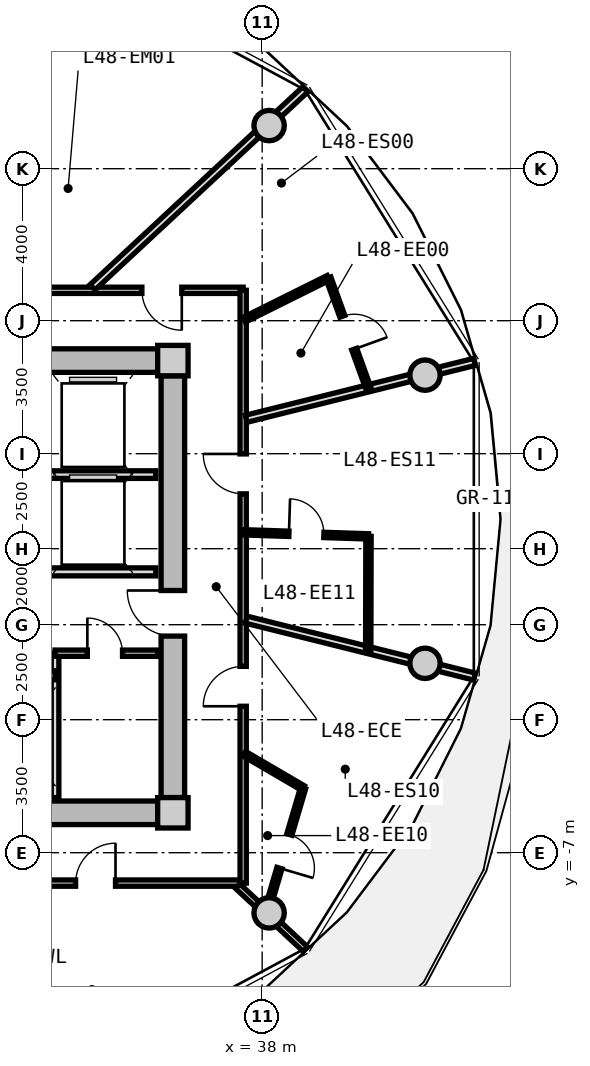
"""IFC4 building model, lengths in metres.
Left out: names, types, materials, properties, quantities, classifications, styles, units other than length and angle.
Written with IfcOpenShell. Run it as: python <this file> out.ifc"""

import sys

from ifc_helpers import new_model, si_unit, direction, frame, frame_2d, origin, origin_2d, place, context, subcontext, project, spatial, rectangle, circle, extrude, source, transform, mapped, element, fill, save


model = new_model("IFC4")
c1 = context("Model", 3, precision=1e-05, world=origin(), true_north=direction((0.0, 1.0)))
c2 = subcontext(c1, "Body", "Model", "MODEL_VIEW")
j1 = project(units=[si_unit("LENGTHUNIT", "METRE"), si_unit("PLANEANGLEUNIT", "RADIAN")], contexts=[c1])
p1 = place(None, origin())
s1 = spatial("IfcSite", under=j1, at=p1, CompositionType="ELEMENT")
p2 = place(p1, origin())
s2 = spatial("IfcBuilding", under=s1, at=p2, CompositionType="ELEMENT")
p3 = place(p2, frame((0.0, 0.0, 155.65)))
s3 = spatial("IfcBuildingStorey", under=s2, at=p3, CompositionType="ELEMENT", Elevation=155.65)
m1 = source(origin(), c2, "Body", "SweptSolid", [
    extrude(rectangle(XDim=0.8, YDim=0.8, at=origin_2d()), origin(), (0.0, 0.0, 1.0), 3.05),
])
for number, where, z_axis, x_axis in (
    (1, (35.65, -5.95, 0.0), (0.0, 0.0, 1.0), (1.0, 0.0, 0.0)),
    (2, (35.65, 5.95, 0.0), (0.0, 0.0, 1.0), (1.0, 0.0, 0.0)),
):
    element("IfcColumn", number, at=place(p3, frame(where, z_axis=z_axis, x_axis=x_axis)), inside=s3, PredefinedType="COLUMN", context=c2, shape_type="MappedRepresentation", body=[
        mapped(m1, transform((0.0, 0.0, 0.0), x_axis=(1.0, 0.0, 0.0), y_axis=(0.0, 1.0, 0.0), z_axis=(0.0, 0.0, 1.0), scale=1.0)),
    ])
m2 = source(origin(), c2, "Body", "SweptSolid", [
    extrude(rectangle(XDim=14.5, YDim=0.62, at=frame_2d((7.25, 0.0))), origin(), (0.0, 0.0, 1.0), 2.81),
])
for number, where, z_axis, x_axis in (
    (3, (20.75, 5.95, 0.0), (0.0, 0.0, 1.0), (1.0, 0.0, 0.0)),
    (4, (35.25, -5.95, 0.0), (0.0, 0.0, 1.0), (-1.0, 0.0, 0.0)),
):
    element("IfcWall", number, at=place(p3, frame(where, z_axis=z_axis, x_axis=x_axis)), inside=s3, PredefinedType="SHEAR", context=c2, shape_type="MappedRepresentation", body=[
        mapped(m2, transform((0.0, 0.0, 0.0), x_axis=(1.0, 0.0, 0.0), y_axis=(0.0, 1.0, 0.0), z_axis=(0.0, 0.0, 1.0), scale=1.0)),
    ])
m3 = source(origin(), c2, "Body", "SweptSolid", [
    extrude(rectangle(XDim=11.1, YDim=0.62, at=frame_2d((5.55, 0.0))), origin(), (0.0, 0.0, 1.0), 2.81),
])
p4 = place(p3, frame((35.65, 5.55, 0.0), z_axis=(0.0, 0.0, 1.0), x_axis=(0.0, -1.0, 0.0)))
e5 = element("IfcWall", 5, at=p4, inside=s3, PredefinedType="SHEAR", context=c2, shape_type="MappedRepresentation", body=[
    mapped(m3, transform((0.0, 0.0, 0.0), x_axis=(1.0, 0.0, 0.0), y_axis=(0.0, 1.0, 0.0), z_axis=(0.0, 0.0, 1.0), scale=1.0)),
])
p5 = place(p4, frame((5.65, 0.0, 0.0)))
e6 = element("IfcOpeningElement", 6, at=p5, cuts=e5, PredefinedType="OPENING", context=c2, shape_type="SweptSolid", body=[
    extrude(rectangle(XDim=1.2, YDim=2.15, at=frame_2d((0.6, 1.075))), frame((0.0, 0.32, 0.0), z_axis=(0.0, -1.0, 0.0), x_axis=(1.0, 0.0, 0.0)), (0.0, 0.0, 1.0), 0.64),
])
m4 = source(origin(), c2, "Body", "SweptSolid", [
    extrude(circle(Radius=0.4, at=origin_2d()), origin(), (0.0, 0.0, 1.0), 3.05),
])
for number, where, z_axis, x_axis in (
    (7, (42.285, 5.567, 0.0), (0.0, 0.0, 1.0), (1.0, 0.0, 0.0)),
    (8, (38.183, 12.135, 0.0), (0.0, 0.0, 1.0), (1.0, 0.0, 0.0)),
    (9, (38.183, -8.584, 0.0), (0.0, 0.0, 1.0), (1.0, 0.0, 0.0)),
    (10, (42.285, -2.016, 0.0), (0.0, 0.0, 1.0), (1.0, 0.0, 0.0)),
):
    element("IfcColumn", number, at=place(p3, frame(where, z_axis=z_axis, x_axis=x_axis)), inside=s3, PredefinedType="COLUMN", context=c2, shape_type="MappedRepresentation", body=[
        mapped(m4, transform((0.0, 0.0, 0.0), x_axis=(1.0, 0.0, 0.0), y_axis=(0.0, 1.0, 0.0), z_axis=(0.0, 0.0, 1.0), scale=1.0)),
    ])
m5 = source(origin(), c2, "Body", "SweptSolid", [
    extrude(rectangle(XDim=3.2, YDim=0.2, at=frame_2d((1.6, 0.0))), origin(), (0.0, 0.0, 1.0), 2.795),
])
p6 = place(p3, frame((32.0, 2.95, 0.0), z_axis=(0.0, 0.0, 1.0), x_axis=(1.0, 0.0, 0.0)))
e11 = element("IfcWall", 11, at=p6, inside=s3, PredefinedType="PARTITIONING", context=c2, shape_type="MappedRepresentation", body=[
    mapped(m5, transform((0.0, 0.0, 0.0), x_axis=(1.0, 0.0, 0.0), y_axis=(0.0, 1.0, 0.0), z_axis=(0.0, 0.0, 1.0), scale=1.0)),
])
m6 = source(origin(), c2, "Body", "SweptSolid", [
    extrude(rectangle(XDim=6.66, YDim=0.21, at=frame_2d((3.33, 0.0))), origin(), (0.0, 0.0, 1.0), 2.795),
])
p7 = place(p3, frame((28.54, 0.39, 0.0), z_axis=(0.0, 0.0, 1.0), x_axis=(1.0, 0.0, 0.0)))
e12 = element("IfcWall", 12, at=p7, inside=s3, PredefinedType="PARTITIONING", context=c2, shape_type="MappedRepresentation", body=[
    mapped(m6, transform((0.0, 0.0, 0.0), x_axis=(1.0, 0.0, 0.0), y_axis=(0.0, 1.0, 0.0), z_axis=(0.0, 0.0, 1.0), scale=1.0)),
])
p8 = place(p7, frame((1.0, 0.0, 0.0)))
e13 = element("IfcOpeningElement", 13, at=p8, cuts=e12, PredefinedType="OPENING", context=c2, shape_type="SweptSolid", body=[
    extrude(rectangle(XDim=1.2, YDim=2.15, at=frame_2d((0.6, 1.075))), frame((0.0, 0.115, 0.0), z_axis=(0.0, -1.0, 0.0), x_axis=(1.0, 0.0, 0.0)), (0.0, 0.0, 1.0), 0.23),
])
m7 = source(origin(), c2, "Body", "SweptSolid", [
    extrude(rectangle(XDim=3.8, YDim=0.2, at=frame_2d((1.9, 0.0))), origin(), (0.0, 0.0, 1.0), 2.795),
])
p9 = place(p3, frame((32.55, -5.55, 0.0), z_axis=(0.0, 0.0, 1.0), x_axis=(0.0, 1.0, 0.0)))
e14 = element("IfcWall", 14, at=p9, inside=s3, PredefinedType="PARTITIONING", context=c2, shape_type="MappedRepresentation", body=[
    mapped(m7, transform((0.0, 0.0, 0.0), x_axis=(1.0, 0.0, 0.0), y_axis=(0.0, 1.0, 0.0), z_axis=(0.0, 0.0, 1.0), scale=1.0)),
])
m8 = source(origin(), c2, "Body", "SweptSolid", [
    extrude(rectangle(XDim=4.13, YDim=0.24, at=frame_2d((2.065, 0.0))), origin(), (0.0, 0.0, 1.0), 2.795),
])
p10 = place(p3, frame((28.42, -2.33, 0.0), z_axis=(0.0, 0.0, 1.0), x_axis=(1.0, 0.0, 0.0)))
e15 = element("IfcWall", 15, at=p10, inside=s3, PredefinedType="PARTITIONING", context=c2, shape_type="MappedRepresentation", body=[
    mapped(m8, transform((0.0, 0.0, 0.0), x_axis=(1.0, 0.0, 0.0), y_axis=(0.0, 1.0, 0.0), z_axis=(0.0, 0.0, 1.0), scale=1.0)),
])
p11 = place(p10, frame((0.5, 0.0, 0.0)))
e16 = element("IfcOpeningElement", 16, at=p11, cuts=e15, PredefinedType="OPENING", context=c2, shape_type="SweptSolid", body=[
    extrude(rectangle(XDim=1.1, YDim=2.2, at=frame_2d((0.55, 1.1))), frame((0.0, 0.13, 0.0), z_axis=(0.0, -1.0, 0.0), x_axis=(1.0, 0.0, 0.0)), (0.0, 0.0, 1.0), 0.26),
])
p12 = place(p10, frame((2.55, 0.0, 0.0)))
e17 = element("IfcOpeningElement", 17, at=p12, cuts=e15, PredefinedType="OPENING", context=c2, shape_type="SweptSolid", body=[
    extrude(rectangle(XDim=1.1, YDim=2.2, at=frame_2d((0.55, 1.1))), frame((0.0, 0.13, 0.0), z_axis=(0.0, -1.0, 0.0), x_axis=(1.0, 0.0, 0.0)), (0.0, 0.0, 1.0), 0.26),
])
m9 = source(origin(), c2, "Body", "SweptSolid", [
    extrude(rectangle(XDim=2.7, YDim=0.165, at=frame_2d((1.35, 0.0))), origin(), (0.0, 0.0, 1.0), 2.795),
])
p13 = place(p3, frame((32.55, -1.75, 0.0), z_axis=(0.0, 0.0, 1.0), x_axis=(1.0, 0.0, 0.0)))
e18 = element("IfcWall", 18, at=p13, inside=s3, PredefinedType="PARTITIONING", context=c2, shape_type="MappedRepresentation", body=[
    mapped(m9, transform((0.0, 0.0, 0.0), x_axis=(1.0, 0.0, 0.0), y_axis=(0.0, 1.0, 0.0), z_axis=(0.0, 0.0, 1.0), scale=1.0)),
])
p14 = place(p13, frame((0.85, 0.0, 0.0)))
e19 = element("IfcOpeningElement", 19, at=p14, cuts=e18, PredefinedType="OPENING", context=c2, shape_type="SweptSolid", body=[
    extrude(rectangle(XDim=0.925, YDim=2.1, at=frame_2d((0.462, 1.05))), frame((0.0, 0.093, 0.0), z_axis=(0.0, -1.0, 0.0), x_axis=(1.0, 0.0, 0.0)), (0.0, 0.0, 1.0), 0.185),
])
m10 = source(origin(), c2, "Body", "SweptSolid", [
    extrude(rectangle(XDim=8.719, YDim=0.165, at=frame_2d((4.36, 0.0))), origin(), (0.0, 0.0, 1.0), 2.795),
])
p15 = place(p3, frame((28.781, 7.8, 0.0), z_axis=(0.0, 0.0, 1.0), x_axis=(1.0, 0.0, 0.0)))
e20 = element("IfcWall", 20, at=p15, inside=s3, PredefinedType="PARTITIONING", context=c2, shape_type="MappedRepresentation", body=[
    mapped(m10, transform((0.0, 0.0, 0.0), x_axis=(1.0, 0.0, 0.0), y_axis=(0.0, 1.0, 0.0), z_axis=(0.0, 0.0, 1.0), scale=1.0)),
])
p16 = place(p15, frame((6.054, 0.0, 0.0)))
e21 = element("IfcOpeningElement", 21, at=p16, cuts=e20, PredefinedType="OPENING", context=c2, shape_type="SweptSolid", body=[
    extrude(rectangle(XDim=1.05, YDim=2.15, at=frame_2d((0.525, 1.075))), frame((0.0, 0.093, 0.0), z_axis=(0.0, -1.0, 0.0), x_axis=(1.0, 0.0, 0.0)), (0.0, 0.0, 1.0), 0.185),
])
p17 = place(p15, frame((1.891, 0.0, 0.0)))
e22 = element("IfcOpeningElement", 22, at=p17, cuts=e20, PredefinedType="OPENING", context=c2, shape_type="SweptSolid", body=[
    extrude(rectangle(XDim=1.25, YDim=2.2, at=frame_2d((0.625, 1.1))), frame((0.0, 0.093, 0.0), z_axis=(0.0, -1.0, 0.0), x_axis=(1.0, 0.0, 0.0)), (0.0, 0.0, 1.0), 0.185),
])
m11 = source(origin(), c2, "Body", "SweptSolid", [
    extrude(rectangle(XDim=8.6, YDim=0.165, at=frame_2d((4.3, 0.0))), origin(), (0.0, 0.0, 1.0), 2.795),
])
p18 = place(p3, frame((37.5, -7.8, 0.0), z_axis=(0.0, 0.0, 1.0), x_axis=(-1.0, 0.0, 0.0)))
e23 = element("IfcWall", 23, at=p18, inside=s3, PredefinedType="PARTITIONING", context=c2, shape_type="MappedRepresentation", body=[
    mapped(m11, transform((0.0, 0.0, 0.0), x_axis=(1.0, 0.0, 0.0), y_axis=(0.0, 1.0, 0.0), z_axis=(0.0, 0.0, 1.0), scale=1.0)),
])
p19 = place(p18, frame((3.359, 0.0, 0.0)))
e24 = element("IfcOpeningElement", 24, at=p19, cuts=e23, PredefinedType="OPENING", context=c2, shape_type="SweptSolid", body=[
    extrude(rectangle(XDim=1.05, YDim=2.15, at=frame_2d((0.525, 1.075))), frame((0.0, 0.093, 0.0), z_axis=(0.0, -1.0, 0.0), x_axis=(1.0, 0.0, 0.0)), (0.0, 0.0, 1.0), 0.185),
])
m12 = source(origin(), c2, "Body", "SweptSolid", [
    extrude(rectangle(XDim=15.6, YDim=0.165, at=frame_2d((7.8, 0.0))), origin(), (0.0, 0.0, 1.0), 2.795),
])
p20 = place(p3, frame((37.5, 7.8, 0.0), z_axis=(0.0, 0.0, 1.0), x_axis=(0.0, -1.0, 0.0)))
e25 = element("IfcWall", 25, at=p20, inside=s3, PredefinedType="PARTITIONING", context=c2, shape_type="MappedRepresentation", body=[
    mapped(m12, transform((0.0, 0.0, 0.0), x_axis=(1.0, 0.0, 0.0), y_axis=(0.0, 1.0, 0.0), z_axis=(0.0, 0.0, 1.0), scale=1.0)),
])
p21 = place(p20, frame((9.896, 0.0, 0.0)))
e26 = element("IfcOpeningElement", 26, at=p21, cuts=e25, PredefinedType="OPENING", context=c2, shape_type="SweptSolid", body=[
    extrude(rectangle(XDim=1.05, YDim=2.15, at=frame_2d((0.525, 1.075))), frame((0.0, 0.093, 0.0), z_axis=(0.0, -1.0, 0.0), x_axis=(1.0, 0.0, 0.0)), (0.0, 0.0, 1.0), 0.185),
])
p22 = place(p20, frame((4.306, 0.0, 0.0)))
e27 = element("IfcOpeningElement", 27, at=p22, cuts=e25, PredefinedType="OPENING", context=c2, shape_type="SweptSolid", body=[
    extrude(rectangle(XDim=1.05, YDim=2.15, at=frame_2d((0.525, 1.075))), frame((0.0, 0.093, 0.0), z_axis=(0.0, -1.0, 0.0), x_axis=(1.0, 0.0, 0.0)), (0.0, 0.0, 1.0), 0.185),
])
m13 = source(origin(), c2, "Body", "SweptSolid", [
    extrude(rectangle(XDim=2.435, YDim=0.165, at=frame_2d((1.217, 0.0))), origin(), (0.0, 0.0, 1.0), 2.345),
])
p23 = place(p3, frame((37.354, -7.88, 0.0), z_axis=(0.0, 0.0, 1.0), x_axis=(0.732164643118, -0.681127693878, 0.0)))
e28 = element("IfcWall", 28, at=p23, inside=s3, PredefinedType="PARTITIONING", context=c2, shape_type="MappedRepresentation", body=[
    mapped(m13, transform((0.0, 0.0, 0.0), x_axis=(1.0, 0.0, 0.0), y_axis=(0.0, 1.0, 0.0), z_axis=(0.0, 0.0, 1.0), scale=1.0)),
])
m14 = source(origin(), c2, "Body", "SweptSolid", [
    extrude(rectangle(XDim=6.193, YDim=0.19, at=frame_2d((3.096, 0.0))), origin(), (0.0, 0.0, 1.0), 2.345),
])
p24 = place(p3, frame((37.58, -0.868, 0.0), z_axis=(0.0, 0.0, 1.0), x_axis=(0.970309243466, -0.241867674657, 0.0)))
e29 = element("IfcWall", 29, at=p24, inside=s3, PredefinedType="PARTITIONING", context=c2, shape_type="MappedRepresentation", body=[
    mapped(m14, transform((0.0, 0.0, 0.0), x_axis=(1.0, 0.0, 0.0), y_axis=(0.0, 1.0, 0.0), z_axis=(0.0, 0.0, 1.0), scale=1.0)),
])
m15 = source(origin(), c2, "Body", "SweptSolid", [
    extrude(rectangle(XDim=1.791, YDim=0.14, at=frame_2d((0.896, 0.0))), origin(), (0.0, 0.0, 1.0), 2.795),
])
p25 = place(p3, frame((37.53, -4.396, 0.0), z_axis=(0.0, 0.0, 1.0), x_axis=(0.863294053295, -0.504701275553, 0.0)))
e30 = element("IfcWall", 30, at=p25, inside=s3, PredefinedType="PARTITIONING", context=c2, shape_type="MappedRepresentation", body=[
    mapped(m15, transform((0.0, 0.0, 0.0), x_axis=(1.0, 0.0, 0.0), y_axis=(0.0, 1.0, 0.0), z_axis=(0.0, 0.0, 1.0), scale=1.0)),
])
m16 = source(origin(), c2, "Body", "SweptSolid", [
    extrude(rectangle(XDim=3.47, YDim=0.14, at=frame_2d((1.735, 0.0))), origin(), (0.0, 0.0, 1.0), 2.795),
])
p26 = place(p3, frame((39.076, -5.3, 0.0), z_axis=(0.0, 0.0, 1.0), x_axis=(-0.283194656898, -0.959062451723, 0.0)))
e31 = element("IfcWall", 31, at=p26, inside=s3, PredefinedType="PARTITIONING", context=c2, shape_type="MappedRepresentation", body=[
    mapped(m16, transform((0.0, 0.0, 0.0), x_axis=(1.0, 0.0, 0.0), y_axis=(0.0, 1.0, 0.0), z_axis=(0.0, 0.0, 1.0), scale=1.0)),
])
p27 = place(p26, frame((1.275, 0.0, 0.0)))
e32 = element("IfcOpeningElement", 32, at=p27, cuts=e31, PredefinedType="OPENING", context=c2, shape_type="SweptSolid", body=[
    extrude(rectangle(XDim=0.92, YDim=2.1, at=frame_2d((0.46, 1.05))), frame((0.0, 0.08, 0.0), z_axis=(0.0, -1.0, 0.0), x_axis=(1.0, 0.0, 0.0)), (0.0, 0.0, 1.0), 0.16),
])
p28 = place(p3, frame((37.58, 4.419, 0.0), z_axis=(0.0, 0.0, 1.0), x_axis=(0.970309243466, 0.241867674657, 0.0)))
e33 = element("IfcWall", 33, at=p28, inside=s3, PredefinedType="PARTITIONING", context=c2, shape_type="MappedRepresentation", body=[
    mapped(m14, transform((0.0, 0.0, 0.0), x_axis=(1.0, 0.0, 0.0), y_axis=(0.0, 1.0, 0.0), z_axis=(0.0, 0.0, 1.0), scale=1.0)),
])
m17 = source(origin(), c2, "Body", "SweptSolid", [
    extrude(rectangle(XDim=3.269, YDim=0.14, at=frame_2d((1.635, 0.0))), origin(), (0.0, 0.0, 1.0), 2.795),
])
p29 = place(p3, frame((37.53, 1.43, 0.0), z_axis=(0.0, 0.0, 1.0), x_axis=(0.999467384322, -0.032633536084, 0.0)))
e34 = element("IfcWall", 34, at=p29, inside=s3, PredefinedType="PARTITIONING", context=c2, shape_type="MappedRepresentation", body=[
    mapped(m17, transform((0.0, 0.0, 0.0), x_axis=(1.0, 0.0, 0.0), y_axis=(0.0, 1.0, 0.0), z_axis=(0.0, 0.0, 1.0), scale=1.0)),
])
p30 = place(p29, frame((1.175, 0.0, 0.0)))
e35 = element("IfcOpeningElement", 35, at=p30, cuts=e34, PredefinedType="OPENING", context=c2, shape_type="SweptSolid", body=[
    extrude(rectangle(XDim=0.92, YDim=2.1, at=frame_2d((0.46, 1.05))), frame((0.0, 0.08, 0.0), z_axis=(0.0, -1.0, 0.0), x_axis=(1.0, 0.0, 0.0)), (0.0, 0.0, 1.0), 0.16),
])
m18 = source(origin(), c2, "Body", "SweptSolid", [
    extrude(rectangle(XDim=3.012, YDim=0.14, at=frame_2d((1.506, 0.0))), origin(), (0.0, 0.0, 1.0), 2.795),
])
p31 = place(p3, frame((40.798, 1.324, 0.0), z_axis=(0.0, 0.0, 1.0), x_axis=(-0.00226958968, -0.999997424478, 0.0)))
e36 = element("IfcWall", 36, at=p31, inside=s3, PredefinedType="PARTITIONING", context=c2, shape_type="MappedRepresentation", body=[
    mapped(m18, transform((0.0, 0.0, 0.0), x_axis=(1.0, 0.0, 0.0), y_axis=(0.0, 1.0, 0.0), z_axis=(0.0, 0.0, 1.0), scale=1.0)),
])
m19 = source(origin(), c2, "Body", "SweptSolid", [
    extrude(rectangle(XDim=7.648, YDim=0.19, at=frame_2d((3.824, 0.0))), origin(), (0.0, 0.0, 1.0), 2.345),
])
p32 = place(p3, frame((33.538, 7.88, 0.0), z_axis=(0.0, 0.0, 1.0), x_axis=(0.732167856666, 0.681124239522, 0.0)))
e37 = element("IfcWall", 37, at=p32, inside=s3, PredefinedType="PARTITIONING", context=c2, shape_type="MappedRepresentation", body=[
    mapped(m19, transform((0.0, 0.0, 0.0), x_axis=(1.0, 0.0, 0.0), y_axis=(0.0, 1.0, 0.0), z_axis=(0.0, 0.0, 1.0), scale=1.0)),
])
m20 = source(origin(), c2, "Body", "SweptSolid", [
    extrude(rectangle(XDim=2.471, YDim=0.14, at=frame_2d((1.235, 0.0))), origin(), (0.0, 0.0, 1.0), 2.795),
])
p33 = place(p3, frame((37.53, 7.026, 0.0), z_axis=(0.0, 0.0, 1.0), x_axis=(0.895295102372, 0.445473545419, 0.0)))
e38 = element("IfcWall", 38, at=p33, inside=s3, PredefinedType="PARTITIONING", context=c2, shape_type="MappedRepresentation", body=[
    mapped(m20, transform((0.0, 0.0, 0.0), x_axis=(1.0, 0.0, 0.0), y_axis=(0.0, 1.0, 0.0), z_axis=(0.0, 0.0, 1.0), scale=1.0)),
])
m21 = source(origin(), c2, "Body", "SweptSolid", [
    extrude(rectangle(XDim=3.072, YDim=0.14, at=frame_2d((1.536, 0.0))), origin(), (0.0, 0.0, 1.0), 2.795),
])
p34 = place(p3, frame((39.742, 8.127, 0.0), z_axis=(0.0, 0.0, 1.0), x_axis=(0.340913456846, -0.94009468403, 0.0)))
e39 = element("IfcWall", 39, at=p34, inside=s3, PredefinedType="PARTITIONING", context=c2, shape_type="MappedRepresentation", body=[
    mapped(m21, transform((0.0, 0.0, 0.0), x_axis=(1.0, 0.0, 0.0), y_axis=(0.0, 1.0, 0.0), z_axis=(0.0, 0.0, 1.0), scale=1.0)),
])
p35 = place(p34, frame((1.076, 0.0, 0.0)))
e40 = element("IfcOpeningElement", 40, at=p35, cuts=e39, PredefinedType="OPENING", context=c2, shape_type="SweptSolid", body=[
    extrude(rectangle(XDim=0.92, YDim=2.1, at=frame_2d((0.46, 1.05))), frame((0.0, 0.08, 0.0), z_axis=(0.0, -1.0, 0.0), x_axis=(1.0, 0.0, 0.0)), (0.0, 0.0, 1.0), 0.16),
])
m22 = source(origin(), c2, "Body", "SweptSolid", [
    extrude(rectangle(XDim=1.2, YDim=2.15, at=frame_2d((0.6, 1.075))), frame((0.0, 0.025, 0.0), z_axis=(0.0, -1.0, 0.0), x_axis=(1.0, 0.0, 0.0)), (0.0, 0.0, 1.0), 0.05),
])
p36 = place(p5, frame((1.2, 0.0, 0.0), z_axis=(0.0, 0.0, 1.0), x_axis=(-1.0, 0.0, 0.0)))
e41 = element("IfcDoor", 41, at=p36, inside=s3, OperationType="SINGLE_SWING_RIGHT", PredefinedType="DOOR", context=c2, shape_type="MappedRepresentation", body=[
    mapped(m22, transform((0.0, 0.0, 0.0), x_axis=(1.0, 0.0, 0.0), y_axis=(0.0, 1.0, 0.0), z_axis=(0.0, 0.0, 1.0), scale=1.0)),
])
fill(e6, e41)
m23 = source(origin(), c2, "Body", "SweptSolid", [
    extrude(rectangle(XDim=0.925, YDim=2.1, at=frame_2d((0.462, 1.05))), frame((0.0, 0.025, 0.0), z_axis=(0.0, -1.0, 0.0), x_axis=(1.0, 0.0, 0.0)), (0.0, 0.0, 1.0), 0.05),
])
p37 = place(p14, origin())
e42 = element("IfcDoor", 42, at=p37, inside=s3, OperationType="SINGLE_SWING_LEFT", PredefinedType="DOOR", context=c2, shape_type="MappedRepresentation", body=[
    mapped(m23, transform((0.0, 0.0, 0.0), x_axis=(1.0, 0.0, 0.0), y_axis=(0.0, 1.0, 0.0), z_axis=(0.0, 0.0, 1.0), scale=1.0)),
])
fill(e19, e42)
m24 = source(origin(), c2, "Body", "SweptSolid", [
    extrude(rectangle(XDim=1.05, YDim=2.15, at=frame_2d((0.525, 1.075))), frame((0.0, 0.025, 0.0), z_axis=(0.0, -1.0, 0.0), x_axis=(1.0, 0.0, 0.0)), (0.0, 0.0, 1.0), 0.05),
])
p38 = place(p19, frame((1.05, 0.0, 0.0), z_axis=(0.0, 0.0, 1.0), x_axis=(-1.0, 0.0, 0.0)))
e43 = element("IfcDoor", 43, at=p38, inside=s3, OperationType="SINGLE_SWING_RIGHT", PredefinedType="DOOR", context=c2, shape_type="MappedRepresentation", body=[
    mapped(m24, transform((0.0, 0.0, 0.0), x_axis=(1.0, 0.0, 0.0), y_axis=(0.0, 1.0, 0.0), z_axis=(0.0, 0.0, 1.0), scale=1.0)),
])
fill(e24, e43)
p39 = place(p21, frame((1.05, 0.0, 0.0), z_axis=(0.0, 0.0, 1.0), x_axis=(-1.0, 0.0, 0.0)))
e44 = element("IfcDoor", 44, at=p39, inside=s3, OperationType="SINGLE_SWING_LEFT", PredefinedType="DOOR", context=c2, shape_type="MappedRepresentation", body=[
    mapped(m24, transform((0.0, 0.0, 0.0), x_axis=(1.0, 0.0, 0.0), y_axis=(0.0, 1.0, 0.0), z_axis=(0.0, 0.0, 1.0), scale=1.0)),
])
fill(e26, e44)
m25 = source(origin(), c2, "Body", "SweptSolid", [
    extrude(rectangle(XDim=0.92, YDim=2.1, at=frame_2d((0.46, 1.05))), frame((0.0, 0.025, 0.0), z_axis=(0.0, -1.0, 0.0), x_axis=(1.0, 0.0, 0.0)), (0.0, 0.0, 1.0), 0.05),
])
p40 = place(p27, origin())
e45 = element("IfcDoor", 45, at=p40, inside=s3, OperationType="SINGLE_SWING_RIGHT", PredefinedType="DOOR", context=c2, shape_type="MappedRepresentation", body=[
    mapped(m25, transform((0.0, 0.0, 0.0), x_axis=(1.0, 0.0, 0.0), y_axis=(0.0, 1.0, 0.0), z_axis=(0.0, 0.0, 1.0), scale=1.0)),
])
fill(e32, e45)
p41 = place(p22, frame((1.05, 0.0, 0.0), z_axis=(0.0, 0.0, 1.0), x_axis=(-1.0, 0.0, 0.0)))
e46 = element("IfcDoor", 46, at=p41, inside=s3, OperationType="SINGLE_SWING_RIGHT", PredefinedType="DOOR", context=c2, shape_type="MappedRepresentation", body=[
    mapped(m24, transform((0.0, 0.0, 0.0), x_axis=(1.0, 0.0, 0.0), y_axis=(0.0, 1.0, 0.0), z_axis=(0.0, 0.0, 1.0), scale=1.0)),
])
fill(e27, e46)
p42 = place(p30, origin())
e47 = element("IfcDoor", 47, at=p42, inside=s3, OperationType="SINGLE_SWING_LEFT", PredefinedType="DOOR", context=c2, shape_type="MappedRepresentation", body=[
    mapped(m25, transform((0.0, 0.0, 0.0), x_axis=(1.0, 0.0, 0.0), y_axis=(0.0, 1.0, 0.0), z_axis=(0.0, 0.0, 1.0), scale=1.0)),
])
fill(e35, e47)
p43 = place(p16, frame((1.05, 0.0, 0.0), z_axis=(0.0, 0.0, 1.0), x_axis=(-1.0, 0.0, 0.0)))
e48 = element("IfcDoor", 48, at=p43, inside=s3, OperationType="SINGLE_SWING_LEFT", PredefinedType="DOOR", context=c2, shape_type="MappedRepresentation", body=[
    mapped(m24, transform((0.0, 0.0, 0.0), x_axis=(1.0, 0.0, 0.0), y_axis=(0.0, 1.0, 0.0), z_axis=(0.0, 0.0, 1.0), scale=1.0)),
])
fill(e21, e48)
p44 = place(p35, origin())
e49 = element("IfcDoor", 49, at=p44, inside=s3, OperationType="SINGLE_SWING_RIGHT", PredefinedType="DOOR", context=c2, shape_type="MappedRepresentation", body=[
    mapped(m25, transform((0.0, 0.0, 0.0), x_axis=(1.0, 0.0, 0.0), y_axis=(0.0, 1.0, 0.0), z_axis=(0.0, 0.0, 1.0), scale=1.0)),
])
fill(e40, e49)
save(model, sys.argv[1])
